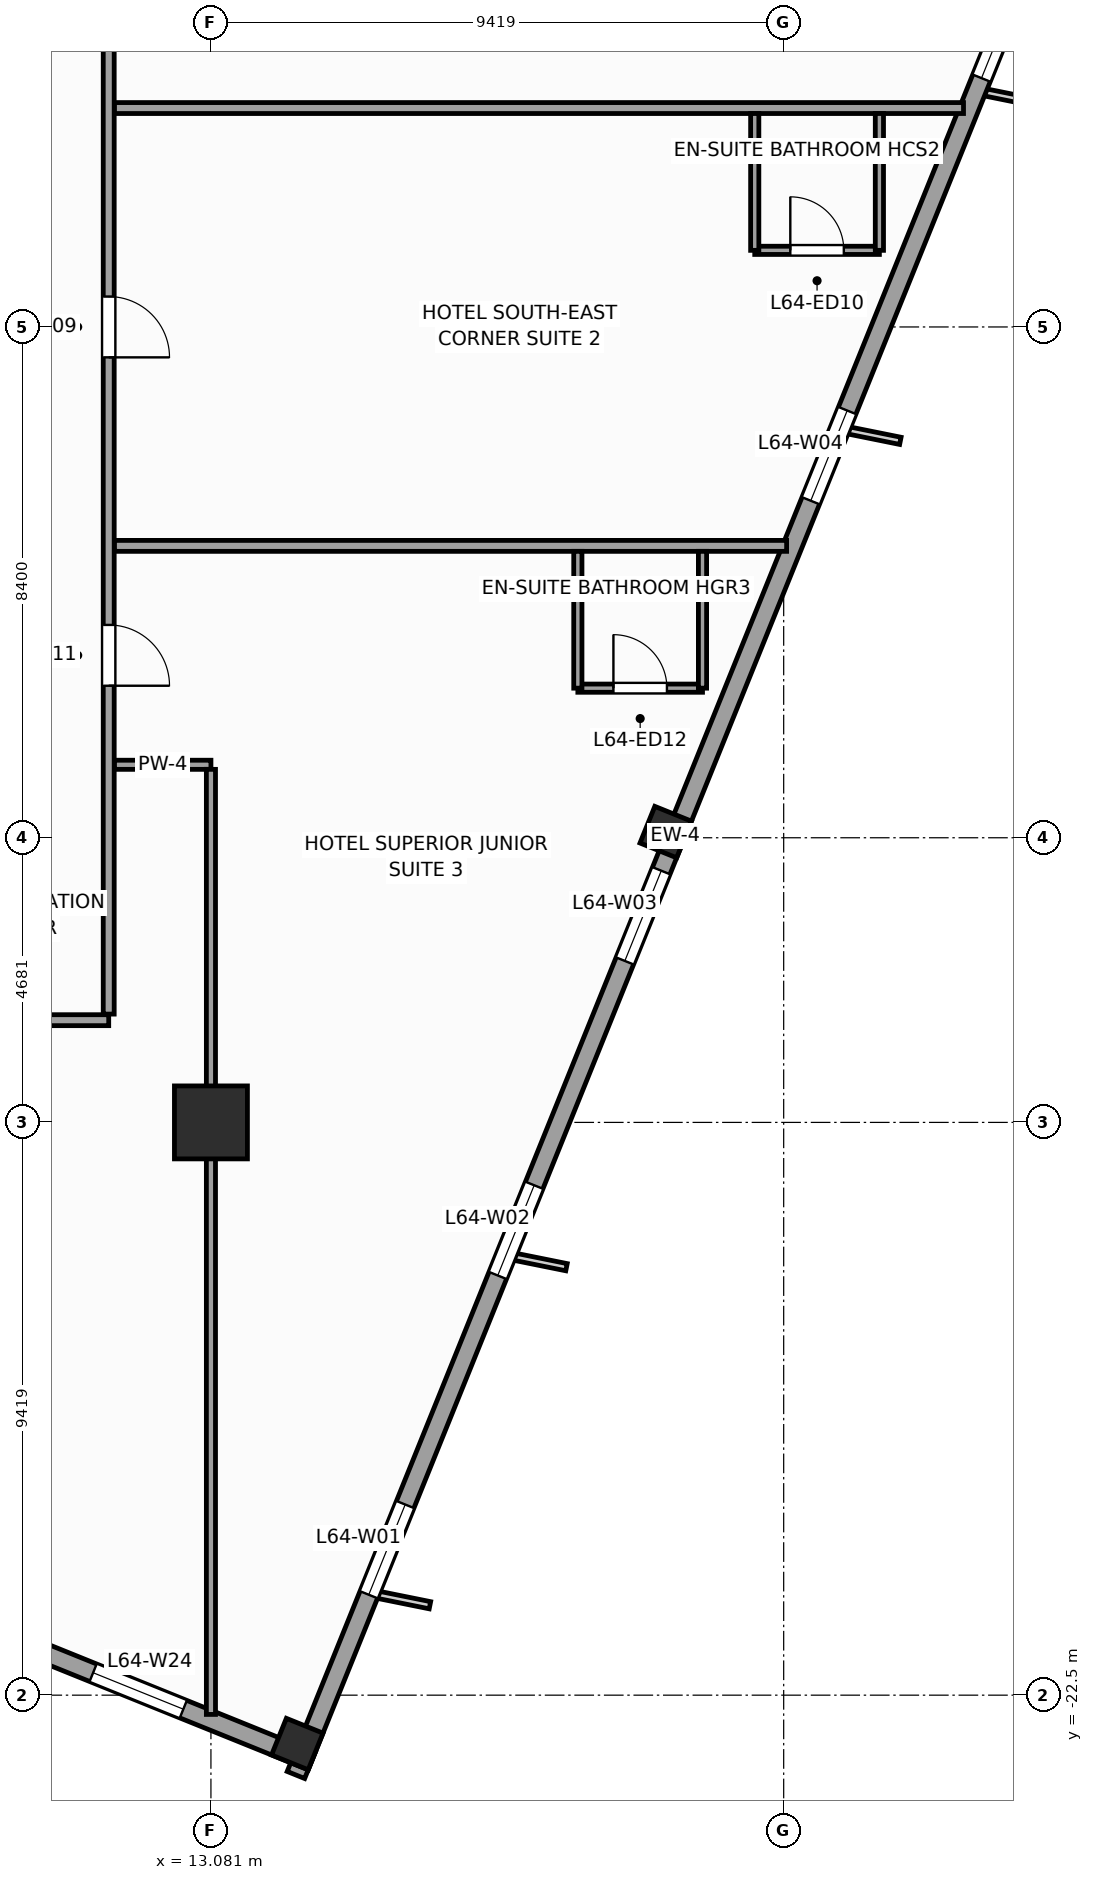
"""IFC4 building model, lengths in metres.
Left out: names, types, materials, properties, quantities, classifications, styles, units other than length and angle.
Written with IfcOpenShell. Run it as: python <this file> out.ifc"""

import sys

from ifc_helpers import new_model, si_unit, direction, frame, frame_2d, origin, origin_2d, place, context, subcontext, project, spatial, rectangle, extrude, source, transform, mapped, element, fill, save


model = new_model("IFC4")
c1 = context("Model", 3, precision=1e-05, world=origin(), true_north=direction((0.0, 1.0)))
c2 = subcontext(c1, "Body", "Model", "MODEL_VIEW")
j1 = project(units=[si_unit("LENGTHUNIT", "METRE"), si_unit("PLANEANGLEUNIT", "RADIAN")], contexts=[c1])
p1 = place(None, origin())
s1 = spatial("IfcSite", under=j1, at=p1, CompositionType="ELEMENT")
p2 = place(p1, origin())
s2 = spatial("IfcBuilding", under=s1, at=p2, CompositionType="ELEMENT")
p3 = place(p2, frame((0.0, 0.0, 265.2)))
s3 = spatial("IfcBuildingStorey", under=s2, at=p3, CompositionType="ELEMENT", Elevation=265.2)
m1 = source(origin(), c2, "Body", "SweptSolid", [
    extrude(rectangle(XDim=1.2, YDim=1.2, at=origin_2d()), origin(), (0.0, 0.0, 1.0), 3.6),
])
p4 = place(p3, frame((13.081, -13.081, 0.0), z_axis=(0.0, 0.0, 1.0), x_axis=(1.0, 0.0, 0.0)))
e1 = element("IfcColumn", 1, at=p4, inside=s3, PredefinedType="COLUMN", context=c2, shape_type="MappedRepresentation", body=[
    mapped(m1, transform((0.0, 0.0, 0.0), scale=1.0)),
])
m2 = source(origin(), c2, "Body", "SweptSolid", [
    extrude(rectangle(XDim=0.65, YDim=0.65, at=origin_2d()), origin(), (0.0, 0.0, 1.0), 3.6),
])
for number, where, z_axis, x_axis in (
    (2, (14.501, -23.304, 0.0), (0.0, 0.0, 1.0), (0.375, 0.927, 0.0)),
    (3, (20.56, -8.307, 0.0), (0.0, 0.0, 1.0), (0.375, 0.927, 0.0)),
):
    element("IfcColumn", number, at=place(p3, frame(where, z_axis=z_axis, x_axis=x_axis)), inside=s3, PredefinedType="COLUMN", context=c2, shape_type="MappedRepresentation", body=[
        mapped(m2, transform((0.0, 0.0, 0.0), scale=1.0)),
    ])
p5 = place(p3, frame((14.479, -23.813, 0.0), z_axis=(0.0, 0.0, 1.0), x_axis=(0.374609557019, 0.927182657188, 0.0)))
e4 = element("IfcWall", 4, at=p5, inside=s3, PredefinedType="STANDARD", context=c2, shape_type="SweptSolid", body=[
    extrude(rectangle(XDim=33.31, YDim=0.31, at=frame_2d((16.655, 0.0))), origin(), (0.0, 0.0, 1.0), 2.75),
])
p6 = place(p5, frame((3.197, 0.0, 0.47)))
e5 = element("IfcOpeningElement", 5, at=p6, cuts=e4, PredefinedType="OPENING", context=c2, shape_type="SweptSolid", body=[
    extrude(rectangle(XDim=1.6, YDim=2.1, at=frame_2d((0.8, 1.05))), frame((0.0, 0.165, 0.0), z_axis=(0.0, -1.0, 0.0), x_axis=(1.0, 0.0, 0.0)), (0.0, 0.0, 1.0), 0.33),
])
p7 = place(p5, frame((8.86, 0.0, 0.47)))
e6 = element("IfcOpeningElement", 6, at=p7, cuts=e4, PredefinedType="OPENING", context=c2, shape_type="SweptSolid", body=[
    extrude(rectangle(XDim=1.6, YDim=2.1, at=frame_2d((0.8, 1.05))), frame((0.0, 0.165, 0.0), z_axis=(0.0, -1.0, 0.0), x_axis=(1.0, 0.0, 0.0)), (0.0, 0.0, 1.0), 0.33),
])
p8 = place(p5, frame((14.439, 0.0, 0.47)))
e7 = element("IfcOpeningElement", 7, at=p8, cuts=e4, PredefinedType="OPENING", context=c2, shape_type="SweptSolid", body=[
    extrude(rectangle(XDim=1.6, YDim=2.1, at=frame_2d((0.8, 1.05))), frame((0.0, 0.165, 0.0), z_axis=(0.0, -1.0, 0.0), x_axis=(1.0, 0.0, 0.0)), (0.0, 0.0, 1.0), 0.33),
])
p9 = place(p5, frame((22.601, 0.0, 0.47)))
e8 = element("IfcOpeningElement", 8, at=p9, cuts=e4, PredefinedType="OPENING", context=c2, shape_type="SweptSolid", body=[
    extrude(rectangle(XDim=1.6, YDim=2.1, at=frame_2d((0.8, 1.05))), frame((0.0, 0.165, 0.0), z_axis=(0.0, -1.0, 0.0), x_axis=(1.0, 0.0, 0.0)), (0.0, 0.0, 1.0), 0.33),
])
p10 = place(p5, frame((30.097, 0.0, 0.47)))
e9 = element("IfcOpeningElement", 9, at=p10, cuts=e4, PredefinedType="OPENING", context=c2, shape_type="SweptSolid", body=[
    extrude(rectangle(XDim=1.6, YDim=2.1, at=frame_2d((0.8, 1.05))), frame((0.0, 0.165, 0.0), z_axis=(0.0, -1.0, 0.0), x_axis=(1.0, 0.0, 0.0)), (0.0, 0.0, 1.0), 0.33),
])
p11 = place(p3, frame((9.032, -21.278, 0.0), z_axis=(0.0, 0.0, 1.0), x_axis=(0.927185411764, -0.374602739196, 0.0)))
e10 = element("IfcWall", 10, at=p11, inside=s3, PredefinedType="STANDARD", context=c2, shape_type="SweptSolid", body=[
    extrude(rectangle(XDim=6.155, YDim=0.31, at=frame_2d((3.078, 0.0))), origin(), (0.0, 0.0, 1.0), 3.35),
])
p12 = place(p11, frame((2.278, 0.0, 0.47)))
e11 = element("IfcOpeningElement", 11, at=p12, cuts=e10, PredefinedType="OPENING", context=c2, shape_type="SweptSolid", body=[
    extrude(rectangle(XDim=1.6, YDim=2.1, at=frame_2d((0.8, 1.05))), frame((0.0, 0.165, 0.0), z_axis=(0.0, -1.0, 0.0), x_axis=(1.0, 0.0, 0.0)), (0.0, 0.0, 1.0), 0.33),
])
p13 = place(p3, frame((-10.3, -11.4, 0.0), z_axis=(0.0, 0.0, 1.0), x_axis=(1.0, 0.0, 0.0)))
e12 = element("IfcWall", 12, at=p13, inside=s3, PredefinedType="PARTITIONING", context=c2, shape_type="SweptSolid", body=[
    extrude(rectangle(XDim=21.7, YDim=0.18, at=frame_2d((10.85, 0.0))), origin(), (0.0, 0.0, 1.0), 3.35),
])
p14 = place(p13, frame((1.605, 0.0, 0.0)))
e13 = element("IfcOpeningElement", 13, at=p14, cuts=e12, PredefinedType="OPENING", context=c2, shape_type="SweptSolid", body=[
    extrude(rectangle(XDim=0.95, YDim=2.1, at=frame_2d((0.475, 1.05))), frame((0.0, 0.1, 0.0), z_axis=(0.0, -1.0, 0.0), x_axis=(1.0, 0.0, 0.0)), (0.0, 0.0, 1.0), 0.2),
])
p15 = place(p13, frame((17.236, 0.0, 0.0)))
e14 = element("IfcOpeningElement", 14, at=p15, cuts=e12, PredefinedType="OPENING", context=c2, shape_type="SweptSolid", body=[
    extrude(rectangle(XDim=1.0, YDim=2.15, at=frame_2d((0.5, 1.075))), frame((0.0, 0.1, 0.0), z_axis=(0.0, -1.0, 0.0), x_axis=(1.0, 0.0, 0.0)), (0.0, 0.0, 1.0), 0.2),
])
p16 = place(p13, frame((9.8, 0.0, 0.0)))
e15 = element("IfcOpeningElement", 15, at=p16, cuts=e12, PredefinedType="OPENING", context=c2, shape_type="SweptSolid", body=[
    extrude(rectangle(XDim=1.0, YDim=2.15, at=frame_2d((0.5, 1.075))), frame((0.0, 0.1, 0.0), z_axis=(0.0, -1.0, 0.0), x_axis=(1.0, 0.0, 0.0)), (0.0, 0.0, 1.0), 0.2),
])
p17 = place(p3, frame((11.4, -11.3, 0.0), z_axis=(0.0, 0.0, 1.0), x_axis=(0.0, 1.0, 0.0)))
e16 = element("IfcWall", 16, at=p17, inside=s3, PredefinedType="PARTITIONING", context=c2, shape_type="SweptSolid", body=[
    extrude(rectangle(XDim=21.5, YDim=0.18, at=frame_2d((10.75, 0.0))), origin(), (0.0, 0.0, 1.0), 3.35),
])
p18 = place(p17, frame((17.536, 0.0, 0.0)))
e17 = element("IfcOpeningElement", 17, at=p18, cuts=e16, PredefinedType="OPENING", context=c2, shape_type="SweptSolid", body=[
    extrude(rectangle(XDim=1.0, YDim=2.15, at=frame_2d((0.5, 1.075))), frame((0.0, 0.1, 0.0), z_axis=(0.0, -1.0, 0.0), x_axis=(1.0, 0.0, 0.0)), (0.0, 0.0, 1.0), 0.2),
])
p19 = place(p17, frame((10.8, 0.0, 0.0)))
e18 = element("IfcOpeningElement", 18, at=p19, cuts=e16, PredefinedType="OPENING", context=c2, shape_type="SweptSolid", body=[
    extrude(rectangle(XDim=1.0, YDim=2.15, at=frame_2d((0.5, 1.075))), frame((0.0, 0.1, 0.0), z_axis=(0.0, -1.0, 0.0), x_axis=(1.0, 0.0, 0.0)), (0.0, 0.0, 1.0), 0.2),
])
p20 = place(p17, frame((5.4, 0.0, 0.0)))
e19 = element("IfcOpeningElement", 19, at=p20, cuts=e16, PredefinedType="OPENING", context=c2, shape_type="SweptSolid", body=[
    extrude(rectangle(XDim=1.0, YDim=2.15, at=frame_2d((0.5, 1.075))), frame((0.0, 0.1, 0.0), z_axis=(0.0, -1.0, 0.0), x_axis=(1.0, 0.0, 0.0)), (0.0, 0.0, 1.0), 0.2),
])
p21 = place(p3, frame((11.495, 3.6, 0.0), z_axis=(0.0, 0.0, 1.0), x_axis=(1.0, 0.0, 0.0)))
e20 = element("IfcWall", 20, at=p21, inside=s3, PredefinedType="PARTITIONING", context=c2, shape_type="SweptSolid", body=[
    extrude(rectangle(XDim=13.962, YDim=0.18, at=frame_2d((6.981, 0.0))), origin(), (0.0, 0.0, 1.0), 3.02),
])
p22 = place(p3, frame((11.495, -3.6, 0.0), z_axis=(0.0, 0.0, 1.0), x_axis=(1.0, 0.0, 0.0)))
e21 = element("IfcWall", 21, at=p22, inside=s3, PredefinedType="PARTITIONING", context=c2, shape_type="SweptSolid", body=[
    extrude(rectangle(XDim=11.053, YDim=0.18, at=frame_2d((5.527, 0.0))), origin(), (0.0, 0.0, 1.0), 3.02),
])
p23 = place(p3, frame((11.495, -7.2, 0.0), z_axis=(0.0, 0.0, 1.0), x_axis=(1.0, 0.0, 0.0)))
e22 = element("IfcWall", 22, at=p23, inside=s3, PredefinedType="PARTITIONING", context=c2, shape_type="SweptSolid", body=[
    extrude(rectangle(XDim=1.586, YDim=0.15, at=frame_2d((0.793, 0.0))), origin(), (0.0, 0.0, 1.0), 3.35),
])
p24 = place(p3, frame((13.081, -7.275, 0.0), z_axis=(0.0, 0.0, 1.0), x_axis=(0.0, -1.0, 0.0)))
e23 = element("IfcWall", 23, at=p24, inside=s3, PredefinedType="PARTITIONING", context=c2, shape_type="SweptSolid", body=[
    extrude(rectangle(XDim=15.542, YDim=0.15, at=frame_2d((7.771, 0.0))), origin(), (0.0, 0.0, 1.0), 2.45),
])
p25 = place(p3, frame((22.024, 1.26, 0.0), z_axis=(0.0, 0.0, 1.0), x_axis=(1.0, 0.0, 0.0)))
e24 = element("IfcWall", 24, at=p25, inside=s3, PredefinedType="PARTITIONING", context=c2, shape_type="SweptSolid", body=[
    extrude(rectangle(XDim=2.05, YDim=0.135, at=frame_2d((1.025, 0.0))), origin(), (0.0, 0.0, 1.0), 3.35),
])
p26 = place(p25, frame((0.585, 0.0, 0.0)))
e25 = element("IfcOpeningElement", 25, at=p26, cuts=e24, PredefinedType="OPENING", context=c2, shape_type="SweptSolid", body=[
    extrude(rectangle(XDim=0.88, YDim=2.1, at=frame_2d((0.44, 1.05))), frame((0.0, 0.078, 0.0), z_axis=(0.0, -1.0, 0.0), x_axis=(1.0, 0.0, 0.0)), (0.0, 0.0, 1.0), 0.155),
])
for number, where, z_axis, x_axis in (
    (26, (24.074, 1.26, 0.0), (0.0, 0.0, 1.0), (0.0, 1.0, 0.0)),
    (27, (22.024, 1.26, 0.0), (0.0, 0.0, 1.0), (0.0, 1.0, 0.0)),
):
    element("IfcWall", number, at=place(p3, frame(where, z_axis=z_axis, x_axis=x_axis)), inside=s3, PredefinedType="PARTITIONING", context=c2, shape_type="SweptSolid", body=[
        extrude(rectangle(XDim=2.25, YDim=0.135, at=frame_2d((1.125, 0.0))), origin(), (0.0, 0.0, 1.0), 3.35),
    ])
p27 = place(p3, frame((19.115, -5.94, 0.0), z_axis=(0.0, 0.0, 1.0), x_axis=(1.0, 0.0, 0.0)))
e28 = element("IfcWall", 28, at=p27, inside=s3, PredefinedType="PARTITIONING", context=c2, shape_type="SweptSolid", body=[
    extrude(rectangle(XDim=2.05, YDim=0.135, at=frame_2d((1.025, 0.0))), origin(), (0.0, 0.0, 1.0), 3.35),
])
p28 = place(p27, frame((0.585, 0.0, 0.0)))
e29 = element("IfcOpeningElement", 29, at=p28, cuts=e28, PredefinedType="OPENING", context=c2, shape_type="SweptSolid", body=[
    extrude(rectangle(XDim=0.88, YDim=2.1, at=frame_2d((0.44, 1.05))), frame((0.0, 0.078, 0.0), z_axis=(0.0, -1.0, 0.0), x_axis=(1.0, 0.0, 0.0)), (0.0, 0.0, 1.0), 0.155),
])
for number, where, z_axis, x_axis in (
    (30, (21.165, -5.94, 0.0), (0.0, 0.0, 1.0), (0.0, 1.0, 0.0)),
    (31, (19.115, -5.94, 0.0), (0.0, 0.0, 1.0), (0.0, 1.0, 0.0)),
):
    element("IfcWall", number, at=place(p3, frame(where, z_axis=z_axis, x_axis=x_axis)), inside=s3, PredefinedType="PARTITIONING", context=c2, shape_type="SweptSolid", body=[
        extrude(rectangle(XDim=2.25, YDim=0.135, at=frame_2d((1.125, 0.0))), origin(), (0.0, 0.0, 1.0), 3.35),
    ])
m3 = source(origin(), c2, "Body", "SweptSolid", [
    extrude(rectangle(XDim=1.6, YDim=2.1, at=frame_2d((0.8, 1.05))), frame((0.0, 0.03, 0.0), z_axis=(0.0, -1.0, 0.0), x_axis=(1.0, 0.0, 0.0)), (0.0, 0.0, 1.0), 0.06),
])
p29 = place(p6, origin())
e32 = element("IfcWindow", 32, at=p29, inside=s3, PartitioningType="SINGLE_PANEL", PredefinedType="WINDOW", context=c2, shape_type="MappedRepresentation", body=[
    mapped(m3, transform((0.0, 0.0, 0.0), scale=1.0)),
])
fill(e5, e32)
p30 = place(p7, origin())
e33 = element("IfcWindow", 33, at=p30, inside=s3, PartitioningType="SINGLE_PANEL", PredefinedType="WINDOW", context=c2, shape_type="MappedRepresentation", body=[
    mapped(m3, transform((0.0, 0.0, 0.0), scale=1.0)),
])
fill(e6, e33)
p31 = place(p8, origin())
e34 = element("IfcWindow", 34, at=p31, inside=s3, PartitioningType="SINGLE_PANEL", PredefinedType="WINDOW", context=c2, shape_type="MappedRepresentation", body=[
    mapped(m3, transform((0.0, 0.0, 0.0), scale=1.0)),
])
fill(e7, e34)
p32 = place(p9, origin())
e35 = element("IfcWindow", 35, at=p32, inside=s3, PartitioningType="SINGLE_PANEL", PredefinedType="WINDOW", context=c2, shape_type="MappedRepresentation", body=[
    mapped(m3, transform((0.0, 0.0, 0.0), scale=1.0)),
])
fill(e8, e35)
p33 = place(p10, origin())
e36 = element("IfcWindow", 36, at=p33, inside=s3, PartitioningType="SINGLE_PANEL", PredefinedType="WINDOW", context=c2, shape_type="MappedRepresentation", body=[
    mapped(m3, transform((0.0, 0.0, 0.0), scale=1.0)),
])
fill(e9, e36)
p34 = place(p12, origin())
e37 = element("IfcWindow", 37, at=p34, inside=s3, PartitioningType="SINGLE_PANEL", PredefinedType="WINDOW", context=c2, shape_type="MappedRepresentation", body=[
    mapped(m3, transform((0.0, 0.0, 0.0), scale=1.0)),
])
fill(e11, e37)
m4 = source(origin(), c2, "Body", "SweptSolid", [
    extrude(rectangle(XDim=1.0, YDim=2.15, at=frame_2d((0.5, 1.075))), frame((0.0, 0.025, 0.0), z_axis=(0.0, -1.0, 0.0), x_axis=(1.0, 0.0, 0.0)), (0.0, 0.0, 1.0), 0.05),
])
p35 = place(p19, frame((1.0, 0.0, 0.0), z_axis=(0.0, 0.0, 1.0), x_axis=(-1.0, 0.0, 0.0)))
e38 = element("IfcDoor", 38, at=p35, inside=s3, OperationType="SINGLE_SWING_LEFT", PredefinedType="DOOR", context=c2, shape_type="MappedRepresentation", body=[
    mapped(m4, transform((0.0, 0.0, 0.0), scale=1.0)),
])
fill(e18, e38)
m5 = source(origin(), c2, "Body", "SweptSolid", [
    extrude(rectangle(XDim=0.88, YDim=2.1, at=frame_2d((0.44, 1.05))), frame((0.0, 0.025, 0.0), z_axis=(0.0, -1.0, 0.0), x_axis=(1.0, 0.0, 0.0)), (0.0, 0.0, 1.0), 0.05),
])
p36 = place(p26, origin())
e39 = element("IfcDoor", 39, at=p36, inside=s3, OperationType="SINGLE_SWING_LEFT", PredefinedType="DOOR", context=c2, shape_type="MappedRepresentation", body=[
    mapped(m5, transform((0.0, 0.0, 0.0), scale=1.0)),
])
fill(e25, e39)
p37 = place(p20, frame((1.0, 0.0, 0.0), z_axis=(0.0, 0.0, 1.0), x_axis=(-1.0, 0.0, 0.0)))
e40 = element("IfcDoor", 40, at=p37, inside=s3, OperationType="SINGLE_SWING_LEFT", PredefinedType="DOOR", context=c2, shape_type="MappedRepresentation", body=[
    mapped(m4, transform((0.0, 0.0, 0.0), scale=1.0)),
])
fill(e19, e40)
p38 = place(p28, origin())
e41 = element("IfcDoor", 41, at=p38, inside=s3, OperationType="SINGLE_SWING_LEFT", PredefinedType="DOOR", context=c2, shape_type="MappedRepresentation", body=[
    mapped(m5, transform((0.0, 0.0, 0.0), scale=1.0)),
])
fill(e29, e41)
save(model, sys.argv[1])
